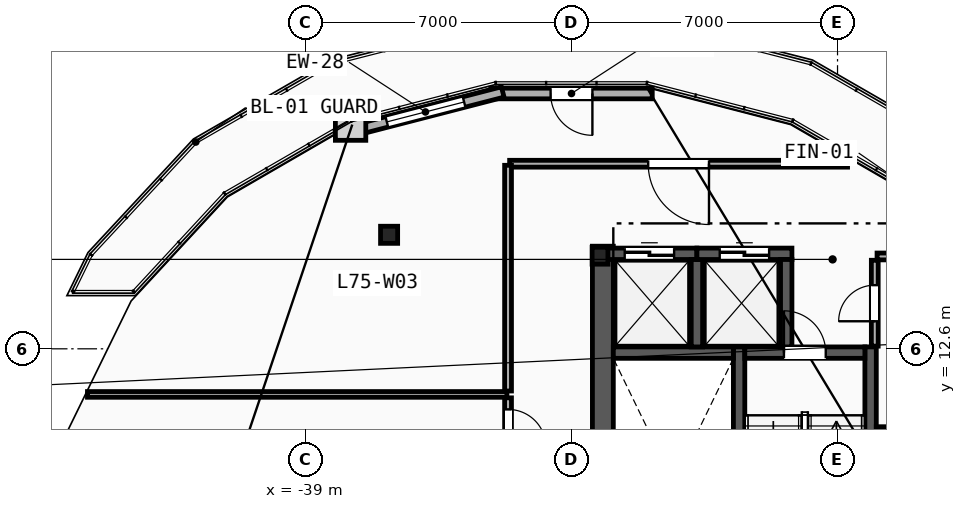
"""IFC4 building model, lengths in metres.
Left out: names, types, materials, properties, quantities, classifications, styles, units other than length and angle.
Written with IfcOpenShell. Run it as: python <this file> out.ifc"""

import sys

from ifc_helpers import new_model, si_unit, direction, frame, frame_2d, origin, origin_2d, place, context, subcontext, project, spatial, rectangle, hollow_rectangle, i_section, extrude, element, fill, save


model = new_model("IFC4")
c1 = context("Model", 3, precision=1e-05, world=origin(), true_north=direction((0.0, 1.0)))
c2 = subcontext(c1, "Body", "Model", "MODEL_VIEW")
j1 = project(units=[si_unit("LENGTHUNIT", "METRE"), si_unit("PLANEANGLEUNIT", "RADIAN")], contexts=[c1])
p1 = place(None, origin())
s1 = spatial("IfcSite", under=j1, at=p1, CompositionType="ELEMENT")
p2 = place(p1, origin())
s2 = spatial("IfcBuilding", under=s1, at=p2, CompositionType="ELEMENT")
p3 = place(p2, frame((0.0, 0.0, 282.8)))
s3 = spatial("IfcBuildingStorey", under=s2, at=p3, CompositionType="ELEMENT", Elevation=282.8)
p4 = place(p3, frame((-31.25, 15.05, 0.0), z_axis=(0.0, 0.0, 1.0), x_axis=(1.0, 0.0, 0.0)))
e1 = element("IfcColumn", 1, at=p4, inside=s3, PredefinedType="COLUMN", context=c2, shape_type="SweptSolid", body=[
    extrude(i_section(OverallWidth=0.416, OverallDepth=0.446, WebThickness=0.039, FlangeThickness=0.063, FilletRadius=0.018, at=origin_2d()), origin(), (0.0, 0.0, 1.0), 3.6),
])
p5 = place(p3, frame((-36.8, 15.6, 0.0), z_axis=(0.0, 0.0, 1.0), x_axis=(1.0, 0.0, 0.0)))
e2 = element("IfcColumn", 2, at=p5, inside=s3, PredefinedType="COLUMN", context=c2, shape_type="SweptSolid", body=[
    extrude(hollow_rectangle(XDim=0.45, YDim=0.45, WallThickness=0.025, at=origin_2d()), origin(), (0.0, 0.0, 1.0), 3.6),
])
p6 = place(p3, frame((-29.875, 19.318, 0.0), z_axis=(0.0, 0.0, 1.0), x_axis=(-1.0, 0.0, 0.0)))
e3 = element("IfcWall", 3, at=p6, inside=s3, PredefinedType="SOLIDWALL", context=c2, shape_type="SweptSolid", body=[
    extrude(rectangle(XDim=4.25, YDim=0.28, at=frame_2d((2.125, 0.0))), origin(), (0.0, 0.0, 1.0), 3.34),
])
p7 = place(p6, frame((1.575, 0.0, 0.0)))
e4 = element("IfcOpeningElement", 4, at=p7, cuts=e3, PredefinedType="OPENING", context=c2, shape_type="SweptSolid", body=[
    extrude(rectangle(XDim=1.1, YDim=2.2, at=frame_2d((0.55, 1.1))), frame((0.0, 0.15, 0.0), z_axis=(0.0, -1.0, 0.0), x_axis=(1.0, 0.0, 0.0)), (0.0, 0.0, 1.0), 0.3),
])
p8 = place(p3, frame((-33.81, 19.358, 0.0), z_axis=(0.0, 0.0, 1.0), x_axis=(-0.968211504127, -0.250132931211, 0.0)))
e5 = element("IfcWall", 5, at=p8, inside=s3, PredefinedType="SOLIDWALL", context=c2, shape_type="SweptSolid", body=[
    extrude(rectangle(XDim=4.2, YDim=0.28, at=frame_2d((2.1, 0.0))), origin(), (0.0, 0.0, 1.0), 3.34),
])
p9 = place(p8, frame((1.05, 0.0, 0.3)))
e6 = element("IfcOpeningElement", 6, at=p9, cuts=e5, PredefinedType="OPENING", context=c2, shape_type="SweptSolid", body=[
    extrude(rectangle(XDim=2.1, YDim=2.6, at=frame_2d((1.05, 1.3))), frame((0.0, 0.15, 0.0), z_axis=(0.0, -1.0, 0.0), x_axis=(1.0, 0.0, 0.0)), (0.0, 0.0, 1.0), 0.3),
])
p10 = place(p3, frame((-31.175, 1.97, 0.0), z_axis=(0.0, 0.0, 1.0), x_axis=(0.0, 1.0, 0.0)))
e7 = element("IfcWall", 7, at=p10, inside=s3, PredefinedType="SHEAR", context=c2, shape_type="SweptSolid", body=[
    extrude(rectangle(XDim=13.33, YDim=0.55, at=frame_2d((6.665, 0.0))), origin(), (0.0, 0.0, 1.0), 3.34),
])
for number, where, z_axis, x_axis in (
    (8, (-27.59, 1.97, 0.0), (0.0, 0.0, 1.0), (0.0, 1.0, 0.0)),
    (9, (-24.13, 1.97, 0.0), (0.0, 0.0, 1.0), (0.0, 1.0, 0.0)),
):
    element("IfcWall", number, at=place(p3, frame(where, z_axis=z_axis, x_axis=x_axis)), inside=s3, PredefinedType="SHEAR", context=c2, shape_type="SweptSolid", body=[
        extrude(rectangle(XDim=10.68, YDim=0.3, at=frame_2d((5.34, 0.0))), origin(), (0.0, 0.0, 1.0), 3.34),
    ])
p11 = place(p3, frame((-30.9, 12.5, 0.0), z_axis=(0.0, 0.0, 1.0), x_axis=(1.0, 0.0, 0.0)))
e10 = element("IfcWall", 10, at=p11, inside=s3, PredefinedType="SHEAR", context=c2, shape_type="SweptSolid", body=[
    extrude(rectangle(XDim=3.16, YDim=0.3, at=frame_2d((1.58, 0.0))), origin(), (0.0, 0.0, 1.0), 3.34),
])
p12 = place(p3, frame((-27.44, 12.5, 0.0), z_axis=(0.0, 0.0, 1.0), x_axis=(1.0, 0.0, 0.0)))
e11 = element("IfcWall", 11, at=p12, inside=s3, PredefinedType="SHEAR", context=c2, shape_type="SweptSolid", body=[
    extrude(rectangle(XDim=3.16, YDim=0.3, at=frame_2d((1.58, 0.0))), origin(), (0.0, 0.0, 1.0), 3.34),
])
p13 = place(p12, frame((1.03, 0.0, 0.0)))
e12 = element("IfcOpeningElement", 12, at=p13, cuts=e11, PredefinedType="OPENING", context=c2, shape_type="SweptSolid", body=[
    extrude(rectangle(XDim=1.1, YDim=2.15, at=frame_2d((0.55, 1.075))), frame((0.0, 0.16, 0.0), z_axis=(0.0, -1.0, 0.0), x_axis=(1.0, 0.0, 0.0)), (0.0, 0.0, 1.0), 0.32),
])
p14 = place(p3, frame((-23.98, 10.4, 0.0), z_axis=(0.0, 0.0, 1.0), x_axis=(1.0, 0.0, 0.0)))
e13 = element("IfcWall", 13, at=p14, inside=s3, PredefinedType="SHEAR", context=c2, shape_type="SweptSolid", body=[
    extrude(rectangle(XDim=2.1, YDim=0.3, at=frame_2d((1.05, 0.0))), origin(), (0.0, 0.0, 1.0), 3.34),
])
p15 = place(p3, frame((-31.2, 15.1, 0.0), z_axis=(0.0, 0.0, 1.0), x_axis=(1.0, 0.0, 0.0)))
e14 = element("IfcWall", 14, at=p15, inside=s3, PredefinedType="SHEAR", context=c2, shape_type="SweptSolid", body=[
    extrude(rectangle(XDim=2.5, YDim=0.3, at=frame_2d((1.25, 0.0))), origin(), (0.0, 0.0, 1.0), 3.34),
])
p16 = place(p15, frame((0.6, 0.0, 0.0)))
e15 = element("IfcOpeningElement", 15, at=p16, cuts=e14, PredefinedType="OPENING", context=c2, shape_type="SweptSolid", body=[
    extrude(rectangle(XDim=1.3, YDim=2.2, at=frame_2d((0.65, 1.1))), frame((0.0, 0.16, 0.0), z_axis=(0.0, -1.0, 0.0), x_axis=(1.0, 0.0, 0.0)), (0.0, 0.0, 1.0), 0.32),
])
p17 = place(p3, frame((-28.7, 12.65, 0.0), z_axis=(0.0, 0.0, 1.0), x_axis=(0.0, 1.0, 0.0)))
e16 = element("IfcWall", 16, at=p17, inside=s3, PredefinedType="SHEAR", context=c2, shape_type="SweptSolid", body=[
    extrude(rectangle(XDim=2.3, YDim=0.3, at=frame_2d((1.15, 0.0))), origin(), (0.0, 0.0, 1.0), 3.34),
])
p18 = place(p3, frame((-28.7, 15.1, 0.0), z_axis=(0.0, 0.0, 1.0), x_axis=(1.0, 0.0, 0.0)))
e17 = element("IfcWall", 17, at=p18, inside=s3, PredefinedType="SHEAR", context=c2, shape_type="SweptSolid", body=[
    extrude(rectangle(XDim=2.5, YDim=0.3, at=frame_2d((1.25, 0.0))), origin(), (0.0, 0.0, 1.0), 3.34),
])
p19 = place(p18, frame((0.6, 0.0, 0.0)))
e18 = element("IfcOpeningElement", 18, at=p19, cuts=e17, PredefinedType="OPENING", context=c2, shape_type="SweptSolid", body=[
    extrude(rectangle(XDim=1.3, YDim=2.2, at=frame_2d((0.65, 1.1))), frame((0.0, 0.16, 0.0), z_axis=(0.0, -1.0, 0.0), x_axis=(1.0, 0.0, 0.0)), (0.0, 0.0, 1.0), 0.32),
])
p20 = place(p3, frame((-26.35, 12.65, 0.0), z_axis=(0.0, 0.0, 1.0), x_axis=(0.0, 1.0, 0.0)))
e19 = element("IfcWall", 19, at=p20, inside=s3, PredefinedType="SHEAR", context=c2, shape_type="SweptSolid", body=[
    extrude(rectangle(XDim=2.3, YDim=0.3, at=frame_2d((1.15, 0.0))), origin(), (0.0, 0.0, 1.0), 3.34),
])
p21 = place(p3, frame((-23.96, 15.03, 0.0), z_axis=(0.0, 0.0, 1.0), x_axis=(1.0, 0.0, 0.0)))
e20 = element("IfcWall", 20, at=p21, inside=s3, PredefinedType="PARTITIONING", context=c2, shape_type="SweptSolid", body=[
    extrude(rectangle(XDim=2.61, YDim=0.18, at=frame_2d((1.305, 0.0))), origin(), (0.0, 0.0, 1.0), 2.413),
])
p22 = place(p3, frame((-24.02, 12.67, 0.0), z_axis=(0.0, 0.0, 1.0), x_axis=(0.0, 1.0, 0.0)))
e21 = element("IfcWall", 21, at=p22, inside=s3, PredefinedType="PARTITIONING", context=c2, shape_type="SweptSolid", body=[
    extrude(rectangle(XDim=2.26, YDim=0.18, at=frame_2d((1.13, 0.0))), origin(), (0.0, 0.0, 1.0), 3.34),
])
p23 = place(p22, frame((0.655, 0.0, 0.0)))
e22 = element("IfcOpeningElement", 22, at=p23, cuts=e21, PredefinedType="OPENING", context=c2, shape_type="SweptSolid", body=[
    extrude(rectangle(XDim=0.95, YDim=2.1, at=frame_2d((0.475, 1.05))), frame((0.0, 0.1, 0.0), z_axis=(0.0, -1.0, 0.0), x_axis=(1.0, 0.0, 0.0)), (0.0, 0.0, 1.0), 0.2),
])
p24 = place(p3, frame((-44.737, 11.4, 0.0), z_axis=(0.0, 0.0, 1.0), x_axis=(1.0, 0.0, 0.0)))
e23 = element("IfcWall", 23, at=p24, inside=s3, PredefinedType="PARTITIONING", context=c2, shape_type="SweptSolid", body=[
    extrude(rectangle(XDim=11.037, YDim=0.15, at=frame_2d((5.519, 0.0))), origin(), (0.0, 0.0, 1.0), 3.34),
])
p25 = place(p3, frame((-33.67, 11.31, 0.0), z_axis=(0.0, 0.0, 1.0), x_axis=(0.0, -1.0, 0.0)))
e24 = element("IfcWall", 24, at=p25, inside=s3, PredefinedType="PARTITIONING", context=c2, shape_type="SweptSolid", body=[
    extrude(rectangle(XDim=1.609, YDim=0.18, at=frame_2d((0.804, 0.0))), origin(), (0.0, 0.0, 1.0), 3.34),
])
p26 = place(p25, frame((0.304, 0.0, 0.0)))
e25 = element("IfcOpeningElement", 25, at=p26, cuts=e24, PredefinedType="OPENING", context=c2, shape_type="SweptSolid", body=[
    extrude(rectangle(XDim=1.0, YDim=2.15, at=frame_2d((0.5, 1.075))), frame((0.0, 0.1, 0.0), z_axis=(0.0, -1.0, 0.0), x_axis=(1.0, 0.0, 0.0)), (0.0, 0.0, 1.0), 0.2),
])
p27 = place(p3, frame((-24.736, 17.47, 0.0), z_axis=(0.0, 0.0, 1.0), x_axis=(-1.0, 0.0, 0.0)))
e26 = element("IfcWall", 26, at=p27, inside=s3, PredefinedType="PARTITIONING", context=c2, shape_type="SweptSolid", body=[
    extrude(rectangle(XDim=8.892, YDim=0.18, at=frame_2d((4.446, 0.0))), origin(), (0.0, 0.0, 1.0), 3.34),
])
p28 = place(p27, frame((3.646, 0.0, 0.0)))
e27 = element("IfcOpeningElement", 27, at=p28, cuts=e26, PredefinedType="OPENING", context=c2, shape_type="SweptSolid", body=[
    extrude(rectangle(XDim=1.6, YDim=2.2, at=frame_2d((0.8, 1.1))), frame((0.0, 0.1, 0.0), z_axis=(0.0, -1.0, 0.0), x_axis=(1.0, 0.0, 0.0)), (0.0, 0.0, 1.0), 0.2),
])
p29 = place(p3, frame((-33.67, 17.428, 0.0), z_axis=(0.0, 0.0, 1.0), x_axis=(0.0, -1.0, 0.0)))
e28 = element("IfcWall", 28, at=p29, inside=s3, PredefinedType="PARTITIONING", context=c2, shape_type="SweptSolid", body=[
    extrude(rectangle(XDim=5.938, YDim=0.18, at=frame_2d((2.969, 0.0))), origin(), (0.0, 0.0, 1.0), 3.34),
])
p30 = place(p7, origin())
e29 = element("IfcDoor", 29, at=p30, inside=s3, OperationType="SINGLE_SWING_LEFT", PredefinedType="DOOR", context=c2, shape_type="SweptSolid", body=[
    extrude(rectangle(XDim=1.1, YDim=2.2, at=frame_2d((0.55, 1.1))), frame((0.0, 0.025, 0.0), z_axis=(0.0, -1.0, 0.0), x_axis=(1.0, 0.0, 0.0)), (0.0, 0.0, 1.0), 0.05),
])
fill(e4, e29)
p31 = place(p9, origin())
e30 = element("IfcWindow", 30, at=p31, inside=s3, PartitioningType="SINGLE_PANEL", PredefinedType="WINDOW", context=c2, shape_type="SweptSolid", body=[
    extrude(rectangle(XDim=2.1, YDim=2.6, at=frame_2d((1.05, 1.3))), frame((0.0, 0.03, 0.0), z_axis=(0.0, -1.0, 0.0), x_axis=(1.0, 0.0, 0.0)), (0.0, 0.0, 1.0), 0.06),
])
fill(e6, e30)
p32 = place(p13, origin())
e31 = element("IfcDoor", 31, at=p32, inside=s3, OperationType="SINGLE_SWING_LEFT", PredefinedType="DOOR", context=c2, shape_type="SweptSolid", body=[
    extrude(rectangle(XDim=1.1, YDim=2.15, at=frame_2d((0.55, 1.075))), frame((0.0, 0.025, 0.0), z_axis=(0.0, -1.0, 0.0), x_axis=(1.0, 0.0, 0.0)), (0.0, 0.0, 1.0), 0.05),
])
fill(e12, e31)
p33 = place(p16, origin())
e32 = element("IfcDoor", 32, at=p33, inside=s3, OperationType="SLIDING_TO_LEFT", PredefinedType="TRAPDOOR", context=c2, shape_type="SweptSolid", body=[
    extrude(rectangle(XDim=1.3, YDim=2.2, at=frame_2d((0.65, 1.1))), frame((0.0, 0.025, 0.0), z_axis=(0.0, -1.0, 0.0), x_axis=(1.0, 0.0, 0.0)), (0.0, 0.0, 1.0), 0.05),
])
fill(e15, e32)
p34 = place(p19, origin())
e33 = element("IfcDoor", 33, at=p34, inside=s3, OperationType="SLIDING_TO_LEFT", PredefinedType="TRAPDOOR", context=c2, shape_type="SweptSolid", body=[
    extrude(rectangle(XDim=1.3, YDim=2.2, at=frame_2d((0.65, 1.1))), frame((0.0, 0.025, 0.0), z_axis=(0.0, -1.0, 0.0), x_axis=(1.0, 0.0, 0.0)), (0.0, 0.0, 1.0), 0.05),
])
fill(e18, e33)
p35 = place(p28, origin())
e34 = element("IfcDoor", 34, at=p35, inside=s3, OperationType="SINGLE_SWING_LEFT", PredefinedType="DOOR", context=c2, shape_type="SweptSolid", body=[
    extrude(rectangle(XDim=1.6, YDim=2.2, at=frame_2d((0.8, 1.1))), frame((0.0, 0.025, 0.0), z_axis=(0.0, -1.0, 0.0), x_axis=(1.0, 0.0, 0.0)), (0.0, 0.0, 1.0), 0.05),
])
fill(e27, e34)
p36 = place(p23, origin())
e35 = element("IfcDoor", 35, at=p36, inside=s3, OperationType="SINGLE_SWING_LEFT", PredefinedType="DOOR", context=c2, shape_type="SweptSolid", body=[
    extrude(rectangle(XDim=0.95, YDim=2.1, at=frame_2d((0.475, 1.05))), frame((0.0, 0.025, 0.0), z_axis=(0.0, -1.0, 0.0), x_axis=(1.0, 0.0, 0.0)), (0.0, 0.0, 1.0), 0.05),
])
fill(e22, e35)
p37 = place(p26, origin())
e36 = element("IfcDoor", 36, at=p37, inside=s3, OperationType="SINGLE_SWING_RIGHT", PredefinedType="DOOR", context=c2, shape_type="SweptSolid", body=[
    extrude(rectangle(XDim=1.0, YDim=2.15, at=frame_2d((0.5, 1.075))), frame((0.0, 0.025, 0.0), z_axis=(0.0, -1.0, 0.0), x_axis=(1.0, 0.0, 0.0)), (0.0, 0.0, 1.0), 0.05),
])
fill(e25, e36)
save(model, sys.argv[1])
